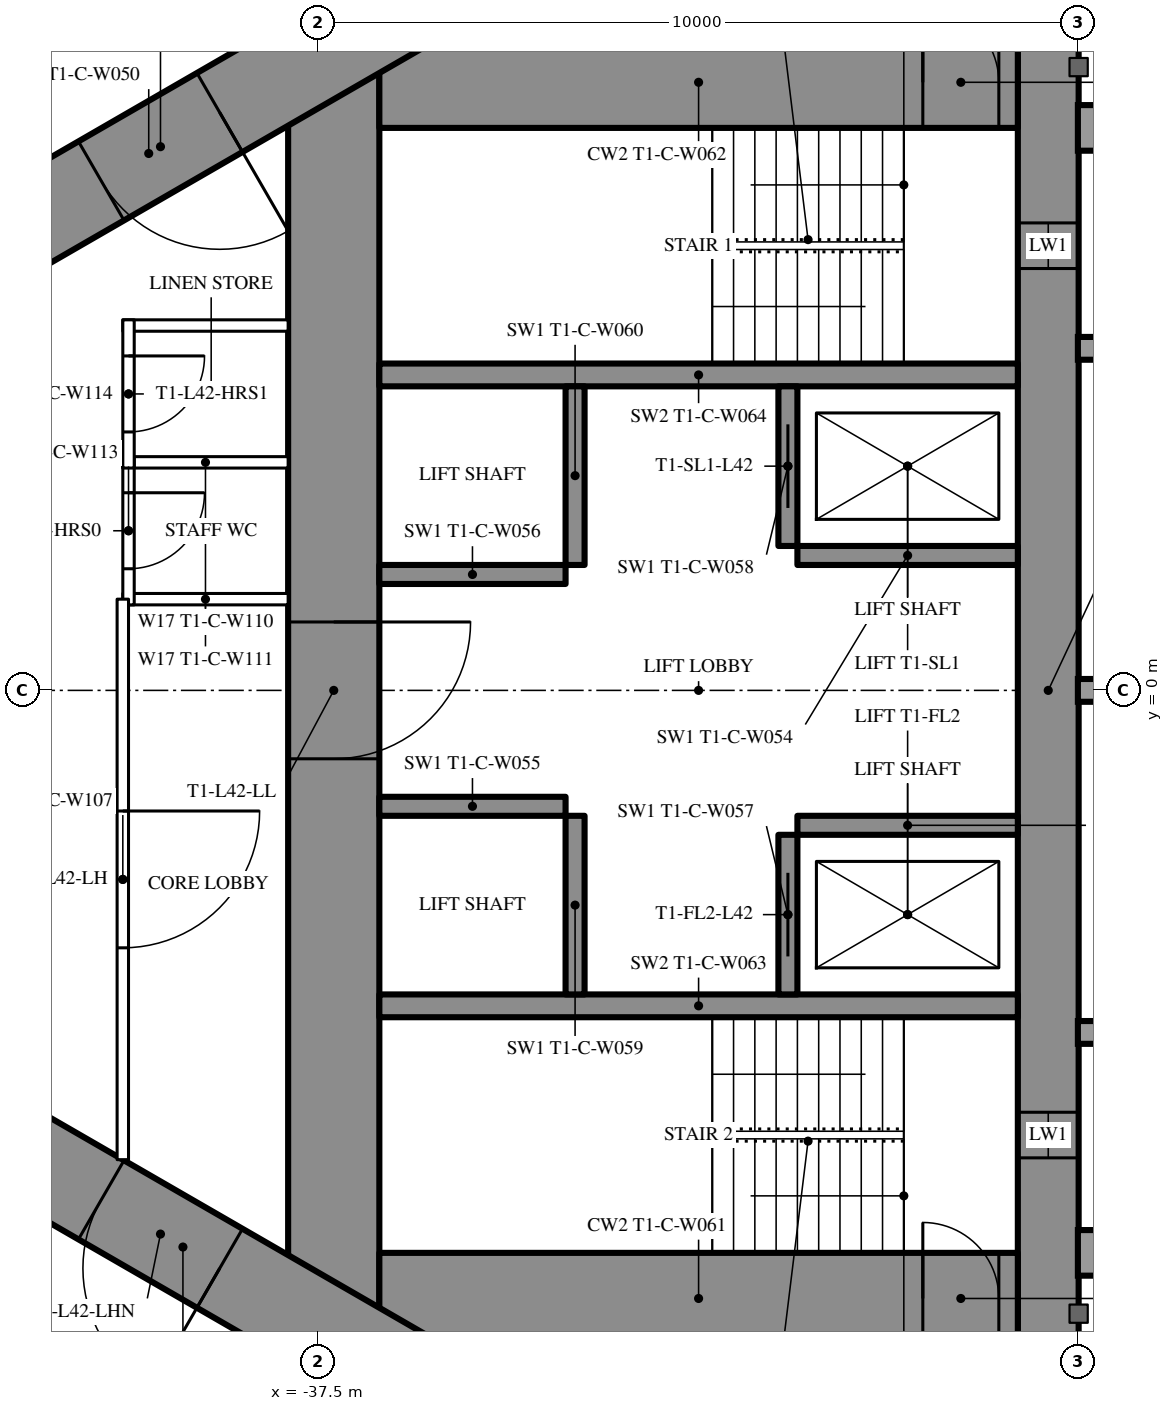
"""IFC4 building model, lengths in metres.
Left out: names, types, materials, properties, quantities, classifications, styles, units other than length and angle.
Written with IfcOpenShell. Run it as: python <this file> out.ifc"""

import sys

from ifc_helpers import new_model, si_unit, direction, frame, frame_2d, origin, place, context, subcontext, project, spatial, rectangle, extrude, element, fill, save


model = new_model("IFC4")
c1 = context("Model", 3, precision=1e-05, world=origin(), true_north=direction((0.0, 1.0)))
c2 = subcontext(c1, "Body", "Model", "MODEL_VIEW")
j1 = project(units=[si_unit("LENGTHUNIT", "METRE"), si_unit("PLANEANGLEUNIT", "RADIAN")], contexts=[c1])
p1 = place(None, origin())
s1 = spatial("IfcSite", under=j1, at=p1, CompositionType="ELEMENT")
p2 = place(p1, origin())
s2 = spatial("IfcBuilding", under=s1, at=p2, CompositionType="ELEMENT")
p3 = place(p2, frame((0.0, 0.0, 159.8)))
s3 = spatial("IfcBuildingStorey", under=s2, at=p3, CompositionType="ELEMENT", Elevation=159.8)
p4 = place(p3, frame((-27.9, 8.6, 0.0), z_axis=(0.0, 0.0, 1.0), x_axis=(0.0, -1.0, 0.0)))
e1 = element("IfcWall", 1, at=p4, inside=s3, PredefinedType="SHEAR", context=c2, shape_type="SweptSolid", body=[
    extrude(rectangle(XDim=17.2, YDim=0.8, at=frame_2d((8.6, 0.0))), origin(), (0.0, 0.0, 1.0), 3.5),
])
p5 = place(p4, frame((2.45, 0.0, 0.6)))
e2 = element("IfcOpeningElement", 2, at=p5, cuts=e1, PredefinedType="OPENING", context=c2, shape_type="SweptSolid", body=[
    extrude(rectangle(XDim=0.6, YDim=2.1, at=frame_2d((0.3, 1.05))), frame((0.0, 0.41, 0.0), z_axis=(0.0, -1.0, 0.0), x_axis=(1.0, 0.0, 0.0)), (0.0, 0.0, 1.0), 0.82),
])
p6 = place(p4, frame((14.15, 0.0, 0.6)))
e3 = element("IfcOpeningElement", 3, at=p6, cuts=e1, PredefinedType="OPENING", context=c2, shape_type="SweptSolid", body=[
    extrude(rectangle(XDim=0.6, YDim=2.1, at=frame_2d((0.3, 1.05))), frame((0.0, 0.41, 0.0), z_axis=(0.0, -1.0, 0.0), x_axis=(1.0, 0.0, 0.0)), (0.0, 0.0, 1.0), 0.82),
])
p7 = place(p3, frame((-37.3, 8.6, 0.0), z_axis=(0.0, 0.0, 1.0), x_axis=(0.0, -1.0, 0.0)))
e4 = element("IfcWall", 4, at=p7, inside=s3, PredefinedType="SHEAR", context=c2, shape_type="SweptSolid", body=[
    extrude(rectangle(XDim=17.2, YDim=1.2, at=frame_2d((8.6, 0.0))), origin(), (0.0, 0.0, 1.0), 3.5),
])
p8 = place(p7, frame((7.7, 0.0, 0.0)))
e5 = element("IfcOpeningElement", 5, at=p8, cuts=e4, PredefinedType="OPENING", context=c2, shape_type="SweptSolid", body=[
    extrude(rectangle(XDim=1.8, YDim=2.2, at=frame_2d((0.9, 1.1))), frame((0.0, 0.61, 0.0), z_axis=(0.0, -1.0, 0.0), x_axis=(1.0, 0.0, 0.0)), (0.0, 0.0, 1.0), 1.22),
])
p9 = place(p3, frame((-28.3, 8.0, 0.0), z_axis=(0.0, 0.0, 1.0), x_axis=(-1.0, 0.0, 0.0)))
e6 = element("IfcWall", 6, at=p9, inside=s3, PredefinedType="SHEAR", context=c2, shape_type="SweptSolid", body=[
    extrude(rectangle(XDim=8.4, YDim=1.2, at=frame_2d((4.2, 0.0))), origin(), (0.0, 0.0, 1.0), 3.5),
])
p10 = place(p9, frame((0.25, 0.0, 0.0)))
e7 = element("IfcOpeningElement", 7, at=p10, cuts=e6, PredefinedType="OPENING", context=c2, shape_type="SweptSolid", body=[
    extrude(rectangle(XDim=1.0, YDim=2.2, at=frame_2d((0.5, 1.1))), frame((0.0, 0.61, 0.0), z_axis=(0.0, -1.0, 0.0), x_axis=(1.0, 0.0, 0.0)), (0.0, 0.0, 1.0), 1.22),
])
p11 = place(p3, frame((-28.3, -8.0, 0.0), z_axis=(0.0, 0.0, 1.0), x_axis=(-1.0, 0.0, 0.0)))
e8 = element("IfcWall", 8, at=p11, inside=s3, PredefinedType="SHEAR", context=c2, shape_type="SweptSolid", body=[
    extrude(rectangle(XDim=8.4, YDim=1.2, at=frame_2d((4.2, 0.0))), origin(), (0.0, 0.0, 1.0), 3.5),
])
p12 = place(p11, frame((0.25, 0.0, 0.0)))
e9 = element("IfcOpeningElement", 9, at=p12, cuts=e8, PredefinedType="OPENING", context=c2, shape_type="SweptSolid", body=[
    extrude(rectangle(XDim=1.0, YDim=2.2, at=frame_2d((0.5, 1.1))), frame((0.0, 0.61, 0.0), z_axis=(0.0, -1.0, 0.0), x_axis=(1.0, 0.0, 0.0)), (0.0, 0.0, 1.0), 1.22),
])
for number, where, z_axis, x_axis in (
    (10, (-28.3, 4.15, 0.0), (0.0, 0.0, 1.0), (-1.0, 0.0, 0.0)),
    (11, (-28.3, -4.15, 0.0), (0.0, 0.0, 1.0), (-1.0, 0.0, 0.0)),
):
    element("IfcWall", number, at=place(p3, frame(where, z_axis=z_axis, x_axis=x_axis)), inside=s3, PredefinedType="SHEAR", context=c2, shape_type="SweptSolid", body=[
        extrude(rectangle(XDim=8.4, YDim=0.3, at=frame_2d((4.2, 0.0))), origin(), (0.0, 0.0, 1.0), 3.5),
    ])
p13 = place(p3, frame((-31.325, 4.0, 0.0), z_axis=(0.0, 0.0, 1.0), x_axis=(0.0, -1.0, 0.0)))
e12 = element("IfcWall", 12, at=p13, inside=s3, PredefinedType="SHEAR", context=c2, shape_type="SweptSolid", body=[
    extrude(rectangle(XDim=2.1, YDim=0.25, at=frame_2d((1.05, 0.0))), origin(), (0.0, 0.0, 1.0), 3.5),
])
p14 = place(p13, frame((0.5, 0.0, 0.0)))
e13 = element("IfcOpeningElement", 13, at=p14, cuts=e12, PredefinedType="OPENING", context=c2, shape_type="SweptSolid", body=[
    extrude(rectangle(XDim=1.1, YDim=2.2, at=frame_2d((0.55, 1.1))), frame((0.0, 0.135, 0.0), z_axis=(0.0, -1.0, 0.0), x_axis=(1.0, 0.0, 0.0)), (0.0, 0.0, 1.0), 0.27),
])
p15 = place(p3, frame((-34.125, 4.0, 0.0), z_axis=(0.0, 0.0, 1.0), x_axis=(0.0, -1.0, 0.0)))
e14 = element("IfcWall", 14, at=p15, inside=s3, PredefinedType="SHEAR", context=c2, shape_type="SweptSolid", body=[
    extrude(rectangle(XDim=2.35, YDim=0.25, at=frame_2d((1.175, 0.0))), origin(), (0.0, 0.0, 1.0), 3.5),
])
p16 = place(p3, frame((-28.3, 1.775, 0.0), z_axis=(0.0, 0.0, 1.0), x_axis=(-1.0, 0.0, 0.0)))
e15 = element("IfcWall", 15, at=p16, inside=s3, PredefinedType="SHEAR", context=c2, shape_type="SweptSolid", body=[
    extrude(rectangle(XDim=2.9, YDim=0.25, at=frame_2d((1.45, 0.0))), origin(), (0.0, 0.0, 1.0), 3.5),
])
p17 = place(p3, frame((-34.25, 1.525, 0.0), z_axis=(0.0, 0.0, 1.0), x_axis=(-1.0, 0.0, 0.0)))
e16 = element("IfcWall", 16, at=p17, inside=s3, PredefinedType="SHEAR", context=c2, shape_type="SweptSolid", body=[
    extrude(rectangle(XDim=2.45, YDim=0.25, at=frame_2d((1.225, 0.0))), origin(), (0.0, 0.0, 1.0), 3.5),
])
p18 = place(p3, frame((-31.325, -1.9, 0.0), z_axis=(0.0, 0.0, 1.0), x_axis=(0.0, -1.0, 0.0)))
e17 = element("IfcWall", 17, at=p18, inside=s3, PredefinedType="SHEAR", context=c2, shape_type="SweptSolid", body=[
    extrude(rectangle(XDim=2.1, YDim=0.25, at=frame_2d((1.05, 0.0))), origin(), (0.0, 0.0, 1.0), 3.5),
])
p19 = place(p18, frame((0.5, 0.0, 0.0)))
e18 = element("IfcOpeningElement", 18, at=p19, cuts=e17, PredefinedType="OPENING", context=c2, shape_type="SweptSolid", body=[
    extrude(rectangle(XDim=1.1, YDim=2.2, at=frame_2d((0.55, 1.1))), frame((0.0, 0.135, 0.0), z_axis=(0.0, -1.0, 0.0), x_axis=(1.0, 0.0, 0.0)), (0.0, 0.0, 1.0), 0.27),
])
p20 = place(p3, frame((-34.125, -1.65, 0.0), z_axis=(0.0, 0.0, 1.0), x_axis=(0.0, -1.0, 0.0)))
e19 = element("IfcWall", 19, at=p20, inside=s3, PredefinedType="SHEAR", context=c2, shape_type="SweptSolid", body=[
    extrude(rectangle(XDim=2.35, YDim=0.25, at=frame_2d((1.175, 0.0))), origin(), (0.0, 0.0, 1.0), 3.5),
])
p21 = place(p3, frame((-28.3, -1.775, 0.0), z_axis=(0.0, 0.0, 1.0), x_axis=(-1.0, 0.0, 0.0)))
e20 = element("IfcWall", 20, at=p21, inside=s3, PredefinedType="SHEAR", context=c2, shape_type="SweptSolid", body=[
    extrude(rectangle(XDim=2.9, YDim=0.25, at=frame_2d((1.45, 0.0))), origin(), (0.0, 0.0, 1.0), 3.5),
])
p22 = place(p3, frame((-34.25, -1.525, 0.0), z_axis=(0.0, 0.0, 1.0), x_axis=(-1.0, 0.0, 0.0)))
e21 = element("IfcWall", 21, at=p22, inside=s3, PredefinedType="SHEAR", context=c2, shape_type="SweptSolid", body=[
    extrude(rectangle(XDim=2.45, YDim=0.25, at=frame_2d((1.225, 0.0))), origin(), (0.0, 0.0, 1.0), 3.5),
])
p23 = place(p3, frame((-27.2, 14.3, 0.0), z_axis=(0.0, 0.0, 1.0), x_axis=(-0.866026593062, -0.499997940104, 0.0)))
e22 = element("IfcWall", 22, at=p23, inside=s3, PredefinedType="SHEAR", context=c2, shape_type="SweptSolid", body=[
    extrude(rectangle(XDim=28.946, YDim=1.2, at=frame_2d((14.473, 0.0))), origin(), (0.0, 0.0, 1.0), 3.5),
])
p24 = place(p23, frame((4.6, 0.0, 0.0)))
e23 = element("IfcOpeningElement", 23, at=p24, cuts=e22, PredefinedType="OPENING", context=c2, shape_type="SweptSolid", body=[
    extrude(rectangle(XDim=1.0, YDim=2.2, at=frame_2d((0.5, 1.1))), frame((0.0, 0.61, 0.0), z_axis=(0.0, -1.0, 0.0), x_axis=(1.0, 0.0, 0.0)), (0.0, 0.0, 1.0), 1.22),
])
p25 = place(p23, frame((13.395, 0.0, 0.0)))
e24 = element("IfcOpeningElement", 24, at=p25, cuts=e22, PredefinedType="OPENING", context=c2, shape_type="SweptSolid", body=[
    extrude(rectangle(XDim=1.8, YDim=2.2, at=frame_2d((0.9, 1.1))), frame((0.0, 0.61, 0.0), z_axis=(0.0, -1.0, 0.0), x_axis=(1.0, 0.0, 0.0)), (0.0, 0.0, 1.0), 1.22),
])
p26 = place(p3, frame((-27.2, -14.3, 0.0), z_axis=(0.0, 0.0, 1.0), x_axis=(-0.866024021859, 0.500002393557, 0.0)))
e25 = element("IfcWall", 25, at=p26, inside=s3, PredefinedType="SHEAR", context=c2, shape_type="SweptSolid", body=[
    extrude(rectangle(XDim=27.907, YDim=1.2, at=frame_2d((13.954, 0.0))), origin(), (0.0, 0.0, 1.0), 3.5),
])
p27 = place(p26, frame((4.6, 0.0, 0.0)))
e26 = element("IfcOpeningElement", 26, at=p27, cuts=e25, PredefinedType="OPENING", context=c2, shape_type="SweptSolid", body=[
    extrude(rectangle(XDim=1.0, YDim=2.2, at=frame_2d((0.5, 1.1))), frame((0.0, 0.61, 0.0), z_axis=(0.0, -1.0, 0.0), x_axis=(1.0, 0.0, 0.0)), (0.0, 0.0, 1.0), 1.22),
])
p28 = place(p26, frame((13.395, 0.0, 0.0)))
e27 = element("IfcOpeningElement", 27, at=p28, cuts=e25, PredefinedType="OPENING", context=c2, shape_type="SweptSolid", body=[
    extrude(rectangle(XDim=1.8, YDim=2.2, at=frame_2d((0.9, 1.1))), frame((0.0, 0.61, 0.0), z_axis=(0.0, -1.0, 0.0), x_axis=(1.0, 0.0, 0.0)), (0.0, 0.0, 1.0), 1.22),
])
for number, where, z_axis, x_axis in (
    (28, (-37.9, 1.2, 0.0), (0.0, 0.0, 1.0), (-1.0, 0.0, 0.0)),
    (29, (-37.9, 3.0, 0.0), (0.0, 0.0, 1.0), (-1.0, 0.0, 0.0)),
    (30, (-37.9, 4.8, 0.0), (0.0, 0.0, 1.0), (-1.0, 0.0, 0.0)),
):
    element("IfcWall", number, at=place(p3, frame(where, z_axis=z_axis, x_axis=x_axis)), inside=s3, PredefinedType="PARTITIONING", context=c2, shape_type="SweptSolid", body=[
        extrude(rectangle(XDim=2.175, YDim=0.15, at=frame_2d((1.087, 0.0))), origin(), (0.0, 0.0, 1.0), 3.25),
    ])
p29 = place(p3, frame((-40.0, 3.075, 0.0), z_axis=(0.0, 0.0, 1.0), x_axis=(0.0, -1.0, 0.0)))
e31 = element("IfcWall", 31, at=p29, inside=s3, PredefinedType="PARTITIONING", context=c2, shape_type="SweptSolid", body=[
    extrude(rectangle(XDim=1.95, YDim=0.15, at=frame_2d((0.975, 0.0))), origin(), (0.0, 0.0, 1.0), 3.25),
])
p30 = place(p29, frame((0.475, 0.0, 0.0)))
e32 = element("IfcOpeningElement", 32, at=p30, cuts=e31, PredefinedType="OPENING", context=c2, shape_type="SweptSolid", body=[
    extrude(rectangle(XDim=1.0, YDim=2.2, at=frame_2d((0.5, 1.1))), frame((0.0, 0.085, 0.0), z_axis=(0.0, -1.0, 0.0), x_axis=(1.0, 0.0, 0.0)), (0.0, 0.0, 1.0), 0.17),
])
p31 = place(p3, frame((-40.0, 4.875, 0.0), z_axis=(0.0, 0.0, 1.0), x_axis=(0.0, -1.0, 0.0)))
e33 = element("IfcWall", 33, at=p31, inside=s3, PredefinedType="PARTITIONING", context=c2, shape_type="SweptSolid", body=[
    extrude(rectangle(XDim=1.95, YDim=0.15, at=frame_2d((0.975, 0.0))), origin(), (0.0, 0.0, 1.0), 3.25),
])
p32 = place(p31, frame((0.475, 0.0, 0.0)))
e34 = element("IfcOpeningElement", 34, at=p32, cuts=e33, PredefinedType="OPENING", context=c2, shape_type="SweptSolid", body=[
    extrude(rectangle(XDim=1.0, YDim=2.2, at=frame_2d((0.5, 1.1))), frame((0.0, 0.085, 0.0), z_axis=(0.0, -1.0, 0.0), x_axis=(1.0, 0.0, 0.0)), (0.0, 0.0, 1.0), 0.17),
])
p33 = place(p3, frame((-40.075, 1.2, 0.0), z_axis=(0.0, 0.0, 1.0), x_axis=(0.0, -1.0, 0.0)))
e35 = element("IfcWall", 35, at=p33, inside=s3, PredefinedType="PARTITIONING", context=c2, shape_type="SweptSolid", body=[
    extrude(rectangle(XDim=7.374, YDim=0.15, at=frame_2d((3.687, 0.0))), origin(), (0.0, 0.0, 1.0), 3.25),
])
p34 = place(p33, frame((2.787, 0.0, 0.0)))
e36 = element("IfcOpeningElement", 36, at=p34, cuts=e35, PredefinedType="OPENING", context=c2, shape_type="SweptSolid", body=[
    extrude(rectangle(XDim=1.8, YDim=2.2, at=frame_2d((0.9, 1.1))), frame((0.0, 0.085, 0.0), z_axis=(0.0, -1.0, 0.0), x_axis=(1.0, 0.0, 0.0)), (0.0, 0.0, 1.0), 0.17),
])
p35 = place(p3, frame((-39.758, -11.697, 0.0), z_axis=(0.0, 0.0, 1.0), x_axis=(-0.866024194504, 0.500002094529, 0.0)))
e37 = element("IfcWall", 37, at=p35, inside=s3, PredefinedType="PARTITIONING", context=c2, shape_type="SweptSolid", body=[
    extrude(rectangle(XDim=6.6, YDim=0.25, at=frame_2d((3.3, 0.0))), origin(), (0.0, 0.0, 1.0), 3.25),
])
p36 = place(p35, frame((0.75, 0.0, 0.0)))
e38 = element("IfcOpeningElement", 38, at=p36, cuts=e37, PredefinedType="OPENING", context=c2, shape_type="SweptSolid", body=[
    extrude(rectangle(XDim=1.1, YDim=2.2, at=frame_2d((0.55, 1.1))), frame((0.0, 0.135, 0.0), z_axis=(0.0, -1.0, 0.0), x_axis=(1.0, 0.0, 0.0)), (0.0, 0.0, 1.0), 0.27),
])
p37 = place(p35, frame((2.75, 0.0, 0.0)))
e39 = element("IfcOpeningElement", 39, at=p37, cuts=e37, PredefinedType="OPENING", context=c2, shape_type="SweptSolid", body=[
    extrude(rectangle(XDim=1.1, YDim=2.2, at=frame_2d((0.55, 1.1))), frame((0.0, 0.135, 0.0), z_axis=(0.0, -1.0, 0.0), x_axis=(1.0, 0.0, 0.0)), (0.0, 0.0, 1.0), 0.27),
])
p38 = place(p35, frame((4.75, 0.0, 0.0)))
e40 = element("IfcOpeningElement", 40, at=p38, cuts=e37, PredefinedType="OPENING", context=c2, shape_type="SweptSolid", body=[
    extrude(rectangle(XDim=1.1, YDim=2.2, at=frame_2d((0.55, 1.1))), frame((0.0, 0.135, 0.0), z_axis=(0.0, -1.0, 0.0), x_axis=(1.0, 0.0, 0.0)), (0.0, 0.0, 1.0), 0.27),
])
p39 = place(p30, origin())
e41 = element("IfcDoor", 41, at=p39, inside=s3, OperationType="SINGLE_SWING_LEFT", PredefinedType="DOOR", context=c2, shape_type="SweptSolid", body=[
    extrude(rectangle(XDim=1.0, YDim=2.2, at=frame_2d((0.5, 1.1))), frame((0.0, 0.025, 0.0), z_axis=(0.0, -1.0, 0.0), x_axis=(1.0, 0.0, 0.0)), (0.0, 0.0, 1.0), 0.05),
])
fill(e32, e41)
p40 = place(p32, origin())
e42 = element("IfcDoor", 42, at=p40, inside=s3, OperationType="SINGLE_SWING_LEFT", PredefinedType="DOOR", context=c2, shape_type="SweptSolid", body=[
    extrude(rectangle(XDim=1.0, YDim=2.2, at=frame_2d((0.5, 1.1))), frame((0.0, 0.025, 0.0), z_axis=(0.0, -1.0, 0.0), x_axis=(1.0, 0.0, 0.0)), (0.0, 0.0, 1.0), 0.05),
])
fill(e34, e42)
p41 = place(p34, origin())
e43 = element("IfcDoor", 43, at=p41, inside=s3, OperationType="DOUBLE_DOOR_SINGLE_SWING", PredefinedType="DOOR", context=c2, shape_type="SweptSolid", body=[
    extrude(rectangle(XDim=1.8, YDim=2.2, at=frame_2d((0.9, 1.1))), frame((0.0, 0.025, 0.0), z_axis=(0.0, -1.0, 0.0), x_axis=(1.0, 0.0, 0.0)), (0.0, 0.0, 1.0), 0.05),
])
fill(e36, e43)
p42 = place(p25, origin())
e44 = element("IfcDoor", 44, at=p42, inside=s3, OperationType="DOUBLE_DOOR_SINGLE_SWING", PredefinedType="DOOR", context=c2, shape_type="SweptSolid", body=[
    extrude(rectangle(XDim=1.8, YDim=2.2, at=frame_2d((0.9, 1.1))), frame((0.0, 0.025, 0.0), z_axis=(0.0, -1.0, 0.0), x_axis=(1.0, 0.0, 0.0)), (0.0, 0.0, 1.0), 0.05),
])
fill(e24, e44)
p43 = place(p28, origin())
e45 = element("IfcDoor", 45, at=p43, inside=s3, OperationType="DOUBLE_DOOR_SINGLE_SWING", PredefinedType="DOOR", context=c2, shape_type="SweptSolid", body=[
    extrude(rectangle(XDim=1.8, YDim=2.2, at=frame_2d((0.9, 1.1))), frame((0.0, 0.025, 0.0), z_axis=(0.0, -1.0, 0.0), x_axis=(1.0, 0.0, 0.0)), (0.0, 0.0, 1.0), 0.05),
])
fill(e27, e45)
p44 = place(p8, origin())
e46 = element("IfcDoor", 46, at=p44, inside=s3, OperationType="DOUBLE_DOOR_SINGLE_SWING", PredefinedType="DOOR", context=c2, shape_type="SweptSolid", body=[
    extrude(rectangle(XDim=1.8, YDim=2.2, at=frame_2d((0.9, 1.1))), frame((0.0, 0.025, 0.0), z_axis=(0.0, -1.0, 0.0), x_axis=(1.0, 0.0, 0.0)), (0.0, 0.0, 1.0), 0.05),
])
fill(e5, e46)
p45 = place(p10, origin())
e47 = element("IfcDoor", 47, at=p45, inside=s3, OperationType="SINGLE_SWING_RIGHT", PredefinedType="DOOR", context=c2, shape_type="SweptSolid", body=[
    extrude(rectangle(XDim=1.0, YDim=2.2, at=frame_2d((0.5, 1.1))), frame((0.0, 0.025, 0.0), z_axis=(0.0, -1.0, 0.0), x_axis=(1.0, 0.0, 0.0)), (0.0, 0.0, 1.0), 0.05),
])
fill(e7, e47)
p46 = place(p12, origin())
e48 = element("IfcDoor", 48, at=p46, inside=s3, OperationType="SINGLE_SWING_RIGHT", PredefinedType="DOOR", context=c2, shape_type="SweptSolid", body=[
    extrude(rectangle(XDim=1.0, YDim=2.2, at=frame_2d((0.5, 1.1))), frame((0.0, 0.025, 0.0), z_axis=(0.0, -1.0, 0.0), x_axis=(1.0, 0.0, 0.0)), (0.0, 0.0, 1.0), 0.05),
])
fill(e9, e48)
p47 = place(p14, origin())
e49 = element("IfcDoor", 49, at=p47, inside=s3, OperationType="SLIDING_TO_LEFT", PredefinedType="USERDEFINED", context=c2, shape_type="SweptSolid", body=[
    extrude(rectangle(XDim=1.1, YDim=2.2, at=frame_2d((0.55, 1.1))), frame((0.0, 0.025, 0.0), z_axis=(0.0, -1.0, 0.0), x_axis=(1.0, 0.0, 0.0)), (0.0, 0.0, 1.0), 0.05),
])
fill(e13, e49)
p48 = place(p19, origin())
e50 = element("IfcDoor", 50, at=p48, inside=s3, OperationType="SLIDING_TO_LEFT", PredefinedType="USERDEFINED", context=c2, shape_type="SweptSolid", body=[
    extrude(rectangle(XDim=1.1, YDim=2.2, at=frame_2d((0.55, 1.1))), frame((0.0, 0.025, 0.0), z_axis=(0.0, -1.0, 0.0), x_axis=(1.0, 0.0, 0.0)), (0.0, 0.0, 1.0), 0.05),
])
fill(e18, e50)
p49 = place(p5, origin())
e51 = element("IfcWindow", 51, at=p49, inside=s3, PartitioningType="SINGLE_PANEL", PredefinedType="WINDOW", context=c2, shape_type="SweptSolid", body=[
    extrude(rectangle(XDim=0.6, YDim=2.1, at=frame_2d((0.3, 1.05))), frame((0.0, 0.03, 0.0), z_axis=(0.0, -1.0, 0.0), x_axis=(1.0, 0.0, 0.0)), (0.0, 0.0, 1.0), 0.06),
])
fill(e2, e51)
p50 = place(p6, origin())
e52 = element("IfcWindow", 52, at=p50, inside=s3, PartitioningType="SINGLE_PANEL", PredefinedType="WINDOW", context=c2, shape_type="SweptSolid", body=[
    extrude(rectangle(XDim=0.6, YDim=2.1, at=frame_2d((0.3, 1.05))), frame((0.0, 0.03, 0.0), z_axis=(0.0, -1.0, 0.0), x_axis=(1.0, 0.0, 0.0)), (0.0, 0.0, 1.0), 0.06),
])
fill(e3, e52)
save(model, sys.argv[1])
